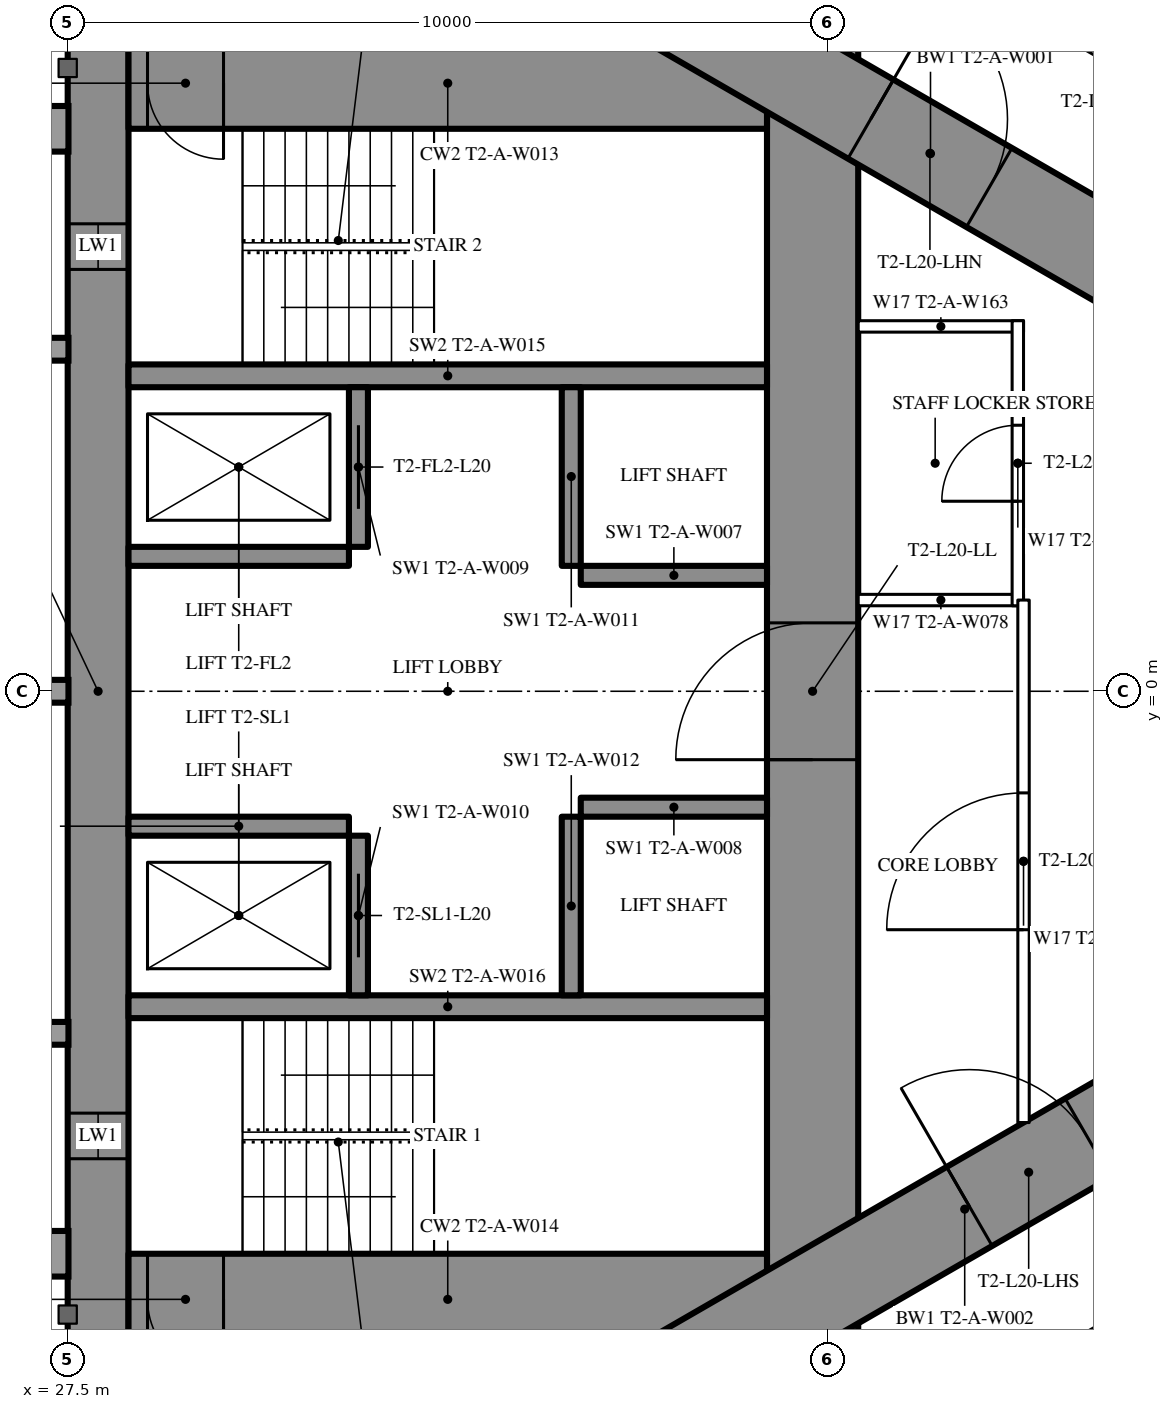
"""IFC4 building model, lengths in metres.
Left out: names, types, materials, properties, quantities, classifications, styles, units other than length and angle.
Written with IfcOpenShell. Run it as: python <this file> out.ifc"""

import sys

from ifc_helpers import new_model, si_unit, direction, frame, frame_2d, origin, place, context, subcontext, project, spatial, rectangle, extrude, element, fill, save


model = new_model("IFC4")
c1 = context("Model", 3, precision=1e-05, world=origin(), true_north=direction((0.0, 1.0)))
c2 = subcontext(c1, "Body", "Model", "MODEL_VIEW")
j1 = project(units=[si_unit("LENGTHUNIT", "METRE"), si_unit("PLANEANGLEUNIT", "RADIAN")], contexts=[c1])
p1 = place(None, origin())
s1 = spatial("IfcSite", under=j1, at=p1, CompositionType="ELEMENT")
p2 = place(p1, origin())
s2 = spatial("IfcBuilding", under=s1, at=p2, CompositionType="ELEMENT")
p3 = place(p2, frame((0.0, 0.0, 77.5)))
s3 = spatial("IfcBuildingStorey", under=s2, at=p3, CompositionType="ELEMENT", Elevation=77.5)
p4 = place(p3, frame((27.9, -8.6, 0.0), z_axis=(0.0, 0.0, 1.0), x_axis=(0.0, 1.0, 0.0)))
e1 = element("IfcWall", 1, at=p4, inside=s3, PredefinedType="SHEAR", context=c2, shape_type="SweptSolid", body=[
    extrude(rectangle(XDim=17.2, YDim=0.8, at=frame_2d((8.6, 0.0))), origin(), (0.0, 0.0, 1.0), 3.5),
])
p5 = place(p4, frame((2.45, 0.0, 0.6)))
e2 = element("IfcOpeningElement", 2, at=p5, cuts=e1, PredefinedType="OPENING", context=c2, shape_type="SweptSolid", body=[
    extrude(rectangle(XDim=0.6, YDim=2.1, at=frame_2d((0.3, 1.05))), frame((0.0, 0.41, 0.0), z_axis=(0.0, -1.0, 0.0), x_axis=(1.0, 0.0, 0.0)), (0.0, 0.0, 1.0), 0.82),
])
p6 = place(p4, frame((14.15, 0.0, 0.6)))
e3 = element("IfcOpeningElement", 3, at=p6, cuts=e1, PredefinedType="OPENING", context=c2, shape_type="SweptSolid", body=[
    extrude(rectangle(XDim=0.6, YDim=2.1, at=frame_2d((0.3, 1.05))), frame((0.0, 0.41, 0.0), z_axis=(0.0, -1.0, 0.0), x_axis=(1.0, 0.0, 0.0)), (0.0, 0.0, 1.0), 0.82),
])
p7 = place(p3, frame((37.3, -8.6, 0.0), z_axis=(0.0, 0.0, 1.0), x_axis=(0.0, 1.0, 0.0)))
e4 = element("IfcWall", 4, at=p7, inside=s3, PredefinedType="SHEAR", context=c2, shape_type="SweptSolid", body=[
    extrude(rectangle(XDim=17.2, YDim=1.2, at=frame_2d((8.6, 0.0))), origin(), (0.0, 0.0, 1.0), 3.5),
])
p8 = place(p7, frame((7.7, 0.0, 0.0)))
e5 = element("IfcOpeningElement", 5, at=p8, cuts=e4, PredefinedType="OPENING", context=c2, shape_type="SweptSolid", body=[
    extrude(rectangle(XDim=1.8, YDim=2.2, at=frame_2d((0.9, 1.1))), frame((0.0, 0.61, 0.0), z_axis=(0.0, -1.0, 0.0), x_axis=(1.0, 0.0, 0.0)), (0.0, 0.0, 1.0), 1.22),
])
p9 = place(p3, frame((28.3, -8.0, 0.0), z_axis=(0.0, 0.0, 1.0), x_axis=(1.0, 0.0, 0.0)))
e6 = element("IfcWall", 6, at=p9, inside=s3, PredefinedType="SHEAR", context=c2, shape_type="SweptSolid", body=[
    extrude(rectangle(XDim=8.4, YDim=1.2, at=frame_2d((4.2, 0.0))), origin(), (0.0, 0.0, 1.0), 3.5),
])
p10 = place(p9, frame((0.25, 0.0, 0.0)))
e7 = element("IfcOpeningElement", 7, at=p10, cuts=e6, PredefinedType="OPENING", context=c2, shape_type="SweptSolid", body=[
    extrude(rectangle(XDim=1.0, YDim=2.2, at=frame_2d((0.5, 1.1))), frame((0.0, 0.61, 0.0), z_axis=(0.0, -1.0, 0.0), x_axis=(1.0, 0.0, 0.0)), (0.0, 0.0, 1.0), 1.22),
])
p11 = place(p3, frame((28.3, 8.0, 0.0), z_axis=(0.0, 0.0, 1.0), x_axis=(1.0, 0.0, 0.0)))
e8 = element("IfcWall", 8, at=p11, inside=s3, PredefinedType="SHEAR", context=c2, shape_type="SweptSolid", body=[
    extrude(rectangle(XDim=8.4, YDim=1.2, at=frame_2d((4.2, 0.0))), origin(), (0.0, 0.0, 1.0), 3.5),
])
p12 = place(p11, frame((0.25, 0.0, 0.0)))
e9 = element("IfcOpeningElement", 9, at=p12, cuts=e8, PredefinedType="OPENING", context=c2, shape_type="SweptSolid", body=[
    extrude(rectangle(XDim=1.0, YDim=2.2, at=frame_2d((0.5, 1.1))), frame((0.0, 0.61, 0.0), z_axis=(0.0, -1.0, 0.0), x_axis=(1.0, 0.0, 0.0)), (0.0, 0.0, 1.0), 1.22),
])
for number, where, z_axis, x_axis in (
    (10, (28.3, -4.15, 0.0), (0.0, 0.0, 1.0), (1.0, 0.0, 0.0)),
    (11, (28.3, 4.15, 0.0), (0.0, 0.0, 1.0), (1.0, 0.0, 0.0)),
):
    element("IfcWall", number, at=place(p3, frame(where, z_axis=z_axis, x_axis=x_axis)), inside=s3, PredefinedType="SHEAR", context=c2, shape_type="SweptSolid", body=[
        extrude(rectangle(XDim=8.4, YDim=0.3, at=frame_2d((4.2, 0.0))), origin(), (0.0, 0.0, 1.0), 3.5),
    ])
p13 = place(p3, frame((31.325, -4.0, 0.0), z_axis=(0.0, 0.0, 1.0), x_axis=(0.0, 1.0, 0.0)))
e12 = element("IfcWall", 12, at=p13, inside=s3, PredefinedType="SHEAR", context=c2, shape_type="SweptSolid", body=[
    extrude(rectangle(XDim=2.1, YDim=0.25, at=frame_2d((1.05, 0.0))), origin(), (0.0, 0.0, 1.0), 3.5),
])
p14 = place(p13, frame((0.5, 0.0, 0.0)))
e13 = element("IfcOpeningElement", 13, at=p14, cuts=e12, PredefinedType="OPENING", context=c2, shape_type="SweptSolid", body=[
    extrude(rectangle(XDim=1.1, YDim=2.2, at=frame_2d((0.55, 1.1))), frame((0.0, 0.135, 0.0), z_axis=(0.0, -1.0, 0.0), x_axis=(1.0, 0.0, 0.0)), (0.0, 0.0, 1.0), 0.27),
])
p15 = place(p3, frame((34.125, -4.0, 0.0), z_axis=(0.0, 0.0, 1.0), x_axis=(0.0, 1.0, 0.0)))
e14 = element("IfcWall", 14, at=p15, inside=s3, PredefinedType="SHEAR", context=c2, shape_type="SweptSolid", body=[
    extrude(rectangle(XDim=2.35, YDim=0.25, at=frame_2d((1.175, 0.0))), origin(), (0.0, 0.0, 1.0), 3.5),
])
p16 = place(p3, frame((28.3, -1.775, 0.0), z_axis=(0.0, 0.0, 1.0), x_axis=(1.0, 0.0, 0.0)))
e15 = element("IfcWall", 15, at=p16, inside=s3, PredefinedType="SHEAR", context=c2, shape_type="SweptSolid", body=[
    extrude(rectangle(XDim=2.9, YDim=0.25, at=frame_2d((1.45, 0.0))), origin(), (0.0, 0.0, 1.0), 3.5),
])
p17 = place(p3, frame((34.25, -1.525, 0.0), z_axis=(0.0, 0.0, 1.0), x_axis=(1.0, 0.0, 0.0)))
e16 = element("IfcWall", 16, at=p17, inside=s3, PredefinedType="SHEAR", context=c2, shape_type="SweptSolid", body=[
    extrude(rectangle(XDim=2.45, YDim=0.25, at=frame_2d((1.225, 0.0))), origin(), (0.0, 0.0, 1.0), 3.5),
])
p18 = place(p3, frame((31.325, 1.9, 0.0), z_axis=(0.0, 0.0, 1.0), x_axis=(0.0, 1.0, 0.0)))
e17 = element("IfcWall", 17, at=p18, inside=s3, PredefinedType="SHEAR", context=c2, shape_type="SweptSolid", body=[
    extrude(rectangle(XDim=2.1, YDim=0.25, at=frame_2d((1.05, 0.0))), origin(), (0.0, 0.0, 1.0), 3.5),
])
p19 = place(p18, frame((0.5, 0.0, 0.0)))
e18 = element("IfcOpeningElement", 18, at=p19, cuts=e17, PredefinedType="OPENING", context=c2, shape_type="SweptSolid", body=[
    extrude(rectangle(XDim=1.1, YDim=2.2, at=frame_2d((0.55, 1.1))), frame((0.0, 0.135, 0.0), z_axis=(0.0, -1.0, 0.0), x_axis=(1.0, 0.0, 0.0)), (0.0, 0.0, 1.0), 0.27),
])
p20 = place(p3, frame((34.125, 1.65, 0.0), z_axis=(0.0, 0.0, 1.0), x_axis=(0.0, 1.0, 0.0)))
e19 = element("IfcWall", 19, at=p20, inside=s3, PredefinedType="SHEAR", context=c2, shape_type="SweptSolid", body=[
    extrude(rectangle(XDim=2.35, YDim=0.25, at=frame_2d((1.175, 0.0))), origin(), (0.0, 0.0, 1.0), 3.5),
])
p21 = place(p3, frame((28.3, 1.775, 0.0), z_axis=(0.0, 0.0, 1.0), x_axis=(1.0, 0.0, 0.0)))
e20 = element("IfcWall", 20, at=p21, inside=s3, PredefinedType="SHEAR", context=c2, shape_type="SweptSolid", body=[
    extrude(rectangle(XDim=2.9, YDim=0.25, at=frame_2d((1.45, 0.0))), origin(), (0.0, 0.0, 1.0), 3.5),
])
p22 = place(p3, frame((34.25, 1.525, 0.0), z_axis=(0.0, 0.0, 1.0), x_axis=(1.0, 0.0, 0.0)))
e21 = element("IfcWall", 21, at=p22, inside=s3, PredefinedType="SHEAR", context=c2, shape_type="SweptSolid", body=[
    extrude(rectangle(XDim=2.45, YDim=0.25, at=frame_2d((1.225, 0.0))), origin(), (0.0, 0.0, 1.0), 3.5),
])
p23 = place(p3, frame((27.2, -13.8, 0.0), z_axis=(0.0, 0.0, 1.0), x_axis=(0.866027159892, 0.499996958321, 0.0)))
e22 = element("IfcWall", 22, at=p23, inside=s3, PredefinedType="SHEAR", context=c2, shape_type="SweptSolid", body=[
    extrude(rectangle(XDim=27.947, YDim=1.2, at=frame_2d((13.973, 0.0))), origin(), (0.0, 0.0, 1.0), 3.5),
])
p24 = place(p23, frame((5.65, 0.0, 0.0)))
e23 = element("IfcOpeningElement", 23, at=p24, cuts=e22, PredefinedType="OPENING", context=c2, shape_type="SweptSolid", body=[
    extrude(rectangle(XDim=1.0, YDim=2.2, at=frame_2d((0.5, 1.1))), frame((0.0, 0.61, 0.0), z_axis=(0.0, -1.0, 0.0), x_axis=(1.0, 0.0, 0.0)), (0.0, 0.0, 1.0), 1.22),
])
p25 = place(p23, frame((14.045, 0.0, 0.0)))
e24 = element("IfcOpeningElement", 24, at=p25, cuts=e22, PredefinedType="OPENING", context=c2, shape_type="SweptSolid", body=[
    extrude(rectangle(XDim=1.8, YDim=2.2, at=frame_2d((0.9, 1.1))), frame((0.0, 0.61, 0.0), z_axis=(0.0, -1.0, 0.0), x_axis=(1.0, 0.0, 0.0)), (0.0, 0.0, 1.0), 1.22),
])
p26 = place(p3, frame((27.2, 13.8, 0.0), z_axis=(0.0, 0.0, 1.0), x_axis=(0.866024515034, -0.500001539357, 0.0)))
e25 = element("IfcWall", 25, at=p26, inside=s3, PredefinedType="SHEAR", context=c2, shape_type="SweptSolid", body=[
    extrude(rectangle(XDim=26.907, YDim=1.2, at=frame_2d((13.454, 0.0))), origin(), (0.0, 0.0, 1.0), 3.5),
])
p27 = place(p26, frame((4.5, 0.0, 0.0)))
e26 = element("IfcOpeningElement", 26, at=p27, cuts=e25, PredefinedType="OPENING", context=c2, shape_type="SweptSolid", body=[
    extrude(rectangle(XDim=1.0, YDim=2.2, at=frame_2d((0.5, 1.1))), frame((0.0, 0.61, 0.0), z_axis=(0.0, -1.0, 0.0), x_axis=(1.0, 0.0, 0.0)), (0.0, 0.0, 1.0), 1.22),
])
p28 = place(p26, frame((12.545, 0.0, 0.0)))
e27 = element("IfcOpeningElement", 27, at=p28, cuts=e25, PredefinedType="OPENING", context=c2, shape_type="SweptSolid", body=[
    extrude(rectangle(XDim=1.8, YDim=2.2, at=frame_2d((0.9, 1.1))), frame((0.0, 0.61, 0.0), z_axis=(0.0, -1.0, 0.0), x_axis=(1.0, 0.0, 0.0)), (0.0, 0.0, 1.0), 1.22),
])
p29 = place(p3, frame((37.96, -10.243, 0.0), z_axis=(0.0, 0.0, 1.0), x_axis=(0.866026429433, 0.499998223521, 0.0)))
e28 = element("IfcWall", 28, at=p29, inside=s3, PredefinedType="PARTITIONING", context=c2, shape_type="SweptSolid", body=[
    extrude(rectangle(XDim=20.487, YDim=0.2, at=frame_2d((10.243, 0.0))), origin(), (0.0, 0.0, 1.0), 3.25),
])
p30 = place(p29, frame((14.142, 0.0, 0.0)))
e29 = element("IfcOpeningElement", 29, at=p30, cuts=e28, PredefinedType="OPENING", context=c2, shape_type="SweptSolid", body=[
    extrude(rectangle(XDim=1.8, YDim=2.2, at=frame_2d((0.9, 1.1))), frame((0.0, 0.11, 0.0), z_axis=(0.0, -1.0, 0.0), x_axis=(1.0, 0.0, 0.0)), (0.0, 0.0, 1.0), 0.22),
])
p31 = place(p29, frame((17.836, 0.0, 0.0)))
e30 = element("IfcOpeningElement", 30, at=p31, cuts=e28, PredefinedType="OPENING", context=c2, shape_type="SweptSolid", body=[
    extrude(rectangle(XDim=1.8, YDim=2.04, at=frame_2d((0.9, 1.02))), frame((0.0, 0.11, 0.0), z_axis=(0.0, -1.0, 0.0), x_axis=(1.0, 0.0, 0.0)), (0.0, 0.0, 1.0), 0.22),
])
p32 = place(p29, frame((5.55, 0.0, 0.0)))
e31 = element("IfcOpeningElement", 31, at=p32, cuts=e28, PredefinedType="OPENING", context=c2, shape_type="SweptSolid", body=[
    extrude(rectangle(XDim=2.0, YDim=2.4, at=frame_2d((1.0, 1.2))), frame((0.0, 0.11, 0.0), z_axis=(0.0, -1.0, 0.0), x_axis=(1.0, 0.0, 0.0)), (0.0, 0.0, 1.0), 0.22),
])
p33 = place(p3, frame((36.834, 10.894, 0.0), z_axis=(0.0, 0.0, 1.0), x_axis=(0.866028157229, -0.499995230863, 0.0)))
e32 = element("IfcWall", 32, at=p33, inside=s3, PredefinedType="PARTITIONING", context=c2, shape_type="SweptSolid", body=[
    extrude(rectangle(XDim=21.667, YDim=0.2, at=frame_2d((10.833, 0.0))), origin(), (0.0, 0.0, 1.0), 3.25),
])
p34 = place(p33, frame((19.076, 0.0, 0.0)))
e33 = element("IfcOpeningElement", 33, at=p34, cuts=e32, PredefinedType="OPENING", context=c2, shape_type="SweptSolid", body=[
    extrude(rectangle(XDim=1.8, YDim=2.04, at=frame_2d((0.9, 1.02))), frame((0.0, 0.11, 0.0), z_axis=(0.0, -1.0, 0.0), x_axis=(1.0, 0.0, 0.0)), (0.0, 0.0, 1.0), 0.22),
])
p35 = place(p33, frame((13.274, 0.0, 0.0)))
e34 = element("IfcOpeningElement", 34, at=p35, cuts=e32, PredefinedType="OPENING", context=c2, shape_type="SweptSolid", body=[
    extrude(rectangle(XDim=1.8, YDim=2.2, at=frame_2d((0.9, 1.1))), frame((0.0, 0.11, 0.0), z_axis=(0.0, -1.0, 0.0), x_axis=(1.0, 0.0, 0.0)), (0.0, 0.0, 1.0), 0.22),
])
p36 = place(p33, frame((4.602, 0.0, 0.0)))
e35 = element("IfcOpeningElement", 35, at=p36, cuts=e32, PredefinedType="OPENING", context=c2, shape_type="SweptSolid", body=[
    extrude(rectangle(XDim=1.8, YDim=2.2, at=frame_2d((0.9, 1.1))), frame((0.0, 0.11, 0.0), z_axis=(0.0, -1.0, 0.0), x_axis=(1.0, 0.0, 0.0)), (0.0, 0.0, 1.0), 0.22),
])
for number, where, z_axis, x_axis in (
    (36, (37.9, 1.2, 0.0), (0.0, 0.0, 1.0), (1.0, 0.0, 0.0)),
    (37, (37.9, 4.8, 0.0), (0.0, 0.0, 1.0), (1.0, 0.0, 0.0)),
):
    element("IfcWall", number, at=place(p3, frame(where, z_axis=z_axis, x_axis=x_axis)), inside=s3, PredefinedType="PARTITIONING", context=c2, shape_type="SweptSolid", body=[
        extrude(rectangle(XDim=2.175, YDim=0.15, at=frame_2d((1.087, 0.0))), origin(), (0.0, 0.0, 1.0), 3.25),
    ])
p37 = place(p3, frame((40.0, 1.125, 0.0), z_axis=(0.0, 0.0, 1.0), x_axis=(0.0, 1.0, 0.0)))
e38 = element("IfcWall", 38, at=p37, inside=s3, PredefinedType="PARTITIONING", context=c2, shape_type="SweptSolid", body=[
    extrude(rectangle(XDim=3.75, YDim=0.15, at=frame_2d((1.875, 0.0))), origin(), (0.0, 0.0, 1.0), 3.25),
])
p38 = place(p37, frame((1.375, 0.0, 0.0)))
e39 = element("IfcOpeningElement", 39, at=p38, cuts=e38, PredefinedType="OPENING", context=c2, shape_type="SweptSolid", body=[
    extrude(rectangle(XDim=1.0, YDim=2.2, at=frame_2d((0.5, 1.1))), frame((0.0, 0.085, 0.0), z_axis=(0.0, -1.0, 0.0), x_axis=(1.0, 0.0, 0.0)), (0.0, 0.0, 1.0), 0.17),
])
p39 = place(p3, frame((40.075, -5.674, 0.0), z_axis=(0.0, 0.0, 1.0), x_axis=(0.0, 1.0, 0.0)))
e40 = element("IfcWall", 40, at=p39, inside=s3, PredefinedType="PARTITIONING", context=c2, shape_type="SweptSolid", body=[
    extrude(rectangle(XDim=6.874, YDim=0.15, at=frame_2d((3.437, 0.0))), origin(), (0.0, 0.0, 1.0), 3.25),
])
p40 = place(p39, frame((2.537, 0.0, 0.0)))
e41 = element("IfcOpeningElement", 41, at=p40, cuts=e40, PredefinedType="OPENING", context=c2, shape_type="SweptSolid", body=[
    extrude(rectangle(XDim=1.8, YDim=2.2, at=frame_2d((0.9, 1.1))), frame((0.0, 0.085, 0.0), z_axis=(0.0, -1.0, 0.0), x_axis=(1.0, 0.0, 0.0)), (0.0, 0.0, 1.0), 0.17),
])
p41 = place(p36, origin())
e42 = element("IfcDoor", 42, at=p41, inside=s3, OperationType="DOUBLE_DOOR_SINGLE_SWING", PredefinedType="DOOR", context=c2, shape_type="SweptSolid", body=[
    extrude(rectangle(XDim=1.8, YDim=2.2, at=frame_2d((0.9, 1.1))), frame((0.0, 0.025, 0.0), z_axis=(0.0, -1.0, 0.0), x_axis=(1.0, 0.0, 0.0)), (0.0, 0.0, 1.0), 0.05),
])
fill(e35, e42)
p42 = place(p38, origin())
e43 = element("IfcDoor", 43, at=p42, inside=s3, OperationType="SINGLE_SWING_LEFT", PredefinedType="DOOR", context=c2, shape_type="SweptSolid", body=[
    extrude(rectangle(XDim=1.0, YDim=2.2, at=frame_2d((0.5, 1.1))), frame((0.0, 0.025, 0.0), z_axis=(0.0, -1.0, 0.0), x_axis=(1.0, 0.0, 0.0)), (0.0, 0.0, 1.0), 0.05),
])
fill(e39, e43)
p43 = place(p40, origin())
e44 = element("IfcDoor", 44, at=p43, inside=s3, OperationType="DOUBLE_DOOR_SINGLE_SWING", PredefinedType="DOOR", context=c2, shape_type="SweptSolid", body=[
    extrude(rectangle(XDim=1.8, YDim=2.2, at=frame_2d((0.9, 1.1))), frame((0.0, 0.025, 0.0), z_axis=(0.0, -1.0, 0.0), x_axis=(1.0, 0.0, 0.0)), (0.0, 0.0, 1.0), 0.05),
])
fill(e41, e44)
p44 = place(p25, origin())
e45 = element("IfcDoor", 45, at=p44, inside=s3, OperationType="DOUBLE_DOOR_SINGLE_SWING", PredefinedType="DOOR", context=c2, shape_type="SweptSolid", body=[
    extrude(rectangle(XDim=1.8, YDim=2.2, at=frame_2d((0.9, 1.1))), frame((0.0, 0.025, 0.0), z_axis=(0.0, -1.0, 0.0), x_axis=(1.0, 0.0, 0.0)), (0.0, 0.0, 1.0), 0.05),
])
fill(e24, e45)
p45 = place(p28, origin())
e46 = element("IfcDoor", 46, at=p45, inside=s3, OperationType="DOUBLE_DOOR_SINGLE_SWING", PredefinedType="DOOR", context=c2, shape_type="SweptSolid", body=[
    extrude(rectangle(XDim=1.8, YDim=2.2, at=frame_2d((0.9, 1.1))), frame((0.0, 0.025, 0.0), z_axis=(0.0, -1.0, 0.0), x_axis=(1.0, 0.0, 0.0)), (0.0, 0.0, 1.0), 0.05),
])
fill(e27, e46)
p46 = place(p8, origin())
e47 = element("IfcDoor", 47, at=p46, inside=s3, OperationType="DOUBLE_DOOR_SINGLE_SWING", PredefinedType="DOOR", context=c2, shape_type="SweptSolid", body=[
    extrude(rectangle(XDim=1.8, YDim=2.2, at=frame_2d((0.9, 1.1))), frame((0.0, 0.025, 0.0), z_axis=(0.0, -1.0, 0.0), x_axis=(1.0, 0.0, 0.0)), (0.0, 0.0, 1.0), 0.05),
])
fill(e5, e47)
p47 = place(p10, origin())
e48 = element("IfcDoor", 48, at=p47, inside=s3, OperationType="SINGLE_SWING_RIGHT", PredefinedType="DOOR", context=c2, shape_type="SweptSolid", body=[
    extrude(rectangle(XDim=1.0, YDim=2.2, at=frame_2d((0.5, 1.1))), frame((0.0, 0.025, 0.0), z_axis=(0.0, -1.0, 0.0), x_axis=(1.0, 0.0, 0.0)), (0.0, 0.0, 1.0), 0.05),
])
fill(e7, e48)
p48 = place(p12, origin())
e49 = element("IfcDoor", 49, at=p48, inside=s3, OperationType="SINGLE_SWING_RIGHT", PredefinedType="DOOR", context=c2, shape_type="SweptSolid", body=[
    extrude(rectangle(XDim=1.0, YDim=2.2, at=frame_2d((0.5, 1.1))), frame((0.0, 0.025, 0.0), z_axis=(0.0, -1.0, 0.0), x_axis=(1.0, 0.0, 0.0)), (0.0, 0.0, 1.0), 0.05),
])
fill(e9, e49)
p49 = place(p14, origin())
e50 = element("IfcDoor", 50, at=p49, inside=s3, OperationType="SLIDING_TO_LEFT", PredefinedType="USERDEFINED", context=c2, shape_type="SweptSolid", body=[
    extrude(rectangle(XDim=1.1, YDim=2.2, at=frame_2d((0.55, 1.1))), frame((0.0, 0.025, 0.0), z_axis=(0.0, -1.0, 0.0), x_axis=(1.0, 0.0, 0.0)), (0.0, 0.0, 1.0), 0.05),
])
fill(e13, e50)
p50 = place(p19, origin())
e51 = element("IfcDoor", 51, at=p50, inside=s3, OperationType="SLIDING_TO_LEFT", PredefinedType="USERDEFINED", context=c2, shape_type="SweptSolid", body=[
    extrude(rectangle(XDim=1.1, YDim=2.2, at=frame_2d((0.55, 1.1))), frame((0.0, 0.025, 0.0), z_axis=(0.0, -1.0, 0.0), x_axis=(1.0, 0.0, 0.0)), (0.0, 0.0, 1.0), 0.05),
])
fill(e18, e51)
p51 = place(p5, origin())
e52 = element("IfcWindow", 52, at=p51, inside=s3, PartitioningType="SINGLE_PANEL", PredefinedType="WINDOW", context=c2, shape_type="SweptSolid", body=[
    extrude(rectangle(XDim=0.6, YDim=2.1, at=frame_2d((0.3, 1.05))), frame((0.0, 0.03, 0.0), z_axis=(0.0, -1.0, 0.0), x_axis=(1.0, 0.0, 0.0)), (0.0, 0.0, 1.0), 0.06),
])
fill(e2, e52)
p52 = place(p6, origin())
e53 = element("IfcWindow", 53, at=p52, inside=s3, PartitioningType="SINGLE_PANEL", PredefinedType="WINDOW", context=c2, shape_type="SweptSolid", body=[
    extrude(rectangle(XDim=0.6, YDim=2.1, at=frame_2d((0.3, 1.05))), frame((0.0, 0.03, 0.0), z_axis=(0.0, -1.0, 0.0), x_axis=(1.0, 0.0, 0.0)), (0.0, 0.0, 1.0), 0.06),
])
fill(e3, e53)
save(model, sys.argv[1])
